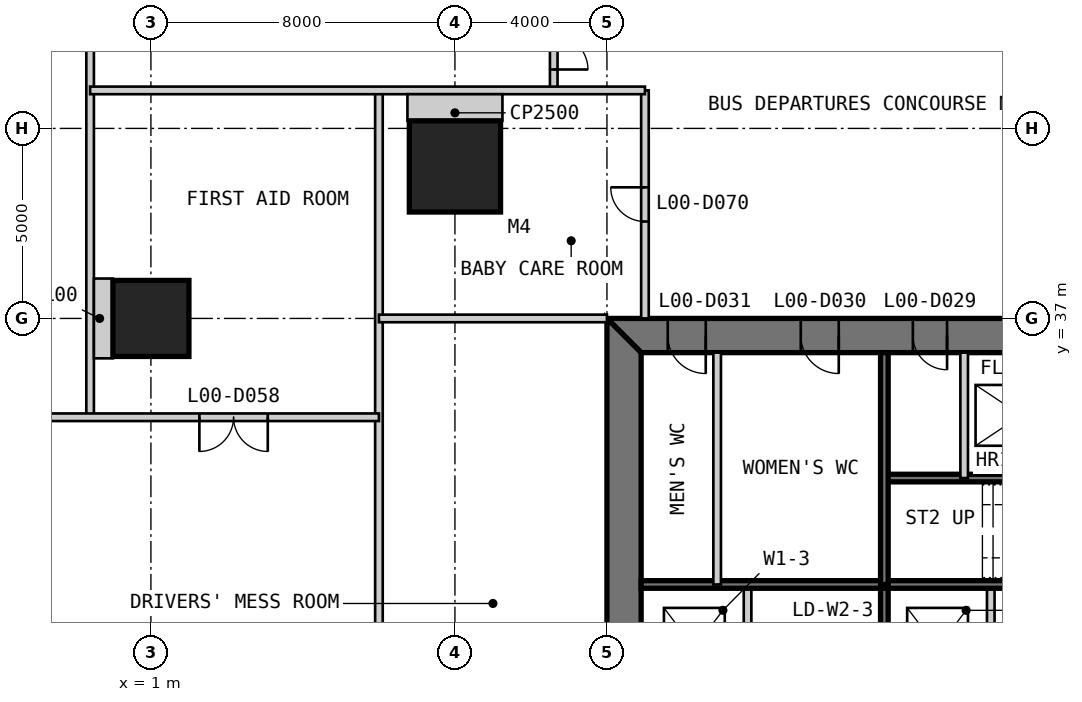
"""IFC4 building model, lengths in metres.
Left out: names, types, materials, properties, quantities, classifications, styles, units other than length and angle.
Written with IfcOpenShell. Run it as: python <this file> out.ifc"""

import sys

from ifc_helpers import new_model, si_unit, direction, frame, frame_2d, origin, origin_2d, place, context, subcontext, project, spatial, polyline, rectangle, outline, extrude, element, fill, save


model = new_model("IFC4")
c1 = context("Model", 3, precision=1e-05, world=origin(), true_north=direction((0.0, 1.0)))
c2 = subcontext(c1, "Body", "Model", "MODEL_VIEW")
j1 = project(units=[si_unit("LENGTHUNIT", "METRE"), si_unit("PLANEANGLEUNIT", "RADIAN")], contexts=[c1])
p1 = place(None, origin())
s1 = spatial("IfcSite", under=j1, at=p1, CompositionType="ELEMENT")
p2 = place(p1, origin())
s2 = spatial("IfcBuilding", under=s1, at=p2, CompositionType="ELEMENT")
p3 = place(p2, origin())
s3 = spatial("IfcBuildingStorey", under=s2, at=p3, CompositionType="ELEMENT", Elevation=0.0)
p4 = place(p3, frame((9.0, 41.0, 0.0), z_axis=(0.0, 0.0, 1.0), x_axis=(1.0, 0.0, 0.0)))
e1 = element("IfcColumn", 1, at=p4, inside=s3, PredefinedType="COLUMN", context=c2, shape_type="SweptSolid", body=[
    extrude(rectangle(XDim=2.4, YDim=2.4, at=origin_2d()), origin(), (0.0, 0.0, 1.0), 7.0),
])
p5 = place(p3, frame((1.0, 37.0, 0.0), z_axis=(0.0, 0.0, 1.0), x_axis=(1.0, 0.0, 0.0)))
e2 = element("IfcColumn", 2, at=p5, inside=s3, PredefinedType="COLUMN", context=c2, shape_type="SweptSolid", body=[
    extrude(rectangle(XDim=2.0, YDim=2.0, at=origin_2d()), origin(), (0.0, 0.0, 1.0), 7.0),
])
p6 = place(p3, frame((37.0, 36.55, 0.0), z_axis=(0.0, 0.0, 1.0), x_axis=(-1.0, 0.0, 0.0)))
e3 = element("IfcWall", 3, at=p6, inside=s3, PredefinedType="SHEAR", context=c2, shape_type="SweptSolid", body=[
    extrude(outline(polyline([(0.0, -0.45), (24.0, -0.45), (23.1, 0.45), (0.9, 0.45), (0.0, -0.45)])), origin(), (0.0, 0.0, 1.0), 7.0),
])
p7 = place(p6, frame((4.9, 0.0, 0.0)))
e4 = element("IfcOpeningElement", 4, at=p7, cuts=e3, PredefinedType="OPENING", context=c2, shape_type="SweptSolid", body=[
    extrude(rectangle(XDim=1.0, YDim=2.2, at=frame_2d((0.5, 1.1))), frame((0.0, 0.46, 0.0), z_axis=(0.0, -1.0, 0.0), x_axis=(1.0, 0.0, 0.0)), (0.0, 0.0, 1.0), 0.92),
])
p8 = place(p6, frame((8.9, 0.0, 0.0)))
e5 = element("IfcOpeningElement", 5, at=p8, cuts=e3, PredefinedType="OPENING", context=c2, shape_type="SweptSolid", body=[
    extrude(rectangle(XDim=1.1, YDim=2.2, at=frame_2d((0.55, 1.1))), frame((0.0, 0.46, 0.0), z_axis=(0.0, -1.0, 0.0), x_axis=(1.0, 0.0, 0.0)), (0.0, 0.0, 1.0), 0.92),
])
p9 = place(p6, frame((15.05, 0.0, 0.0)))
e6 = element("IfcOpeningElement", 6, at=p9, cuts=e3, PredefinedType="OPENING", context=c2, shape_type="SweptSolid", body=[
    extrude(rectangle(XDim=0.9, YDim=2.2, at=frame_2d((0.45, 1.1))), frame((0.0, 0.46, 0.0), z_axis=(0.0, -1.0, 0.0), x_axis=(1.0, 0.0, 0.0)), (0.0, 0.0, 1.0), 0.92),
])
p10 = place(p6, frame((17.9, 0.0, 0.0)))
e7 = element("IfcOpeningElement", 7, at=p10, cuts=e3, PredefinedType="OPENING", context=c2, shape_type="SweptSolid", body=[
    extrude(rectangle(XDim=1.0, YDim=2.2, at=frame_2d((0.5, 1.1))), frame((0.0, 0.46, 0.0), z_axis=(0.0, -1.0, 0.0), x_axis=(1.0, 0.0, 0.0)), (0.0, 0.0, 1.0), 0.92),
])
p11 = place(p6, frame((21.4, 0.0, 0.0)))
e8 = element("IfcOpeningElement", 8, at=p11, cuts=e3, PredefinedType="OPENING", context=c2, shape_type="SweptSolid", body=[
    extrude(rectangle(XDim=1.0, YDim=2.2, at=frame_2d((0.5, 1.1))), frame((0.0, 0.46, 0.0), z_axis=(0.0, -1.0, 0.0), x_axis=(1.0, 0.0, 0.0)), (0.0, 0.0, 1.0), 0.92),
])
p12 = place(p3, frame((13.45, 36.1, 0.0), z_axis=(0.0, 0.0, 1.0), x_axis=(0.0, -1.0, 0.0)))
e9 = element("IfcWall", 9, at=p12, inside=s3, PredefinedType="SHEAR", context=c2, shape_type="SweptSolid", body=[
    extrude(outline(polyline([(-0.9, -0.45), (23.1, -0.45), (22.2, 0.45), (0.0, 0.45), (-0.9, -0.45)])), origin(), (0.0, 0.0, 1.0), 7.0),
])
p13 = place(p12, frame((20.2, 0.0, 0.0)))
e10 = element("IfcOpeningElement", 10, at=p13, cuts=e9, PredefinedType="OPENING", context=c2, shape_type="SweptSolid", body=[
    extrude(rectangle(XDim=1.0, YDim=2.2, at=frame_2d((0.5, 1.1))), frame((0.0, 0.46, 0.0), z_axis=(0.0, -1.0, 0.0), x_axis=(1.0, 0.0, 0.0)), (0.0, 0.0, 1.0), 0.92),
])
p14 = place(p12, frame((17.25, 0.0, 0.0)))
e11 = element("IfcOpeningElement", 11, at=p14, cuts=e9, PredefinedType="OPENING", context=c2, shape_type="SweptSolid", body=[
    extrude(rectangle(XDim=0.9, YDim=2.2, at=frame_2d((0.45, 1.1))), frame((0.0, 0.46, 0.0), z_axis=(0.0, -1.0, 0.0), x_axis=(1.0, 0.0, 0.0)), (0.0, 0.0, 1.0), 0.92),
])
p15 = place(p3, frame((16.7, 13.9, 0.0), z_axis=(0.0, 0.0, 1.0), x_axis=(0.0, 1.0, 0.0)))
e12 = element("IfcWall", 12, at=p15, inside=s3, PredefinedType="PARTITIONING", context=c2, shape_type="SweptSolid", body=[
    extrude(rectangle(XDim=16.1, YDim=0.2, at=frame_2d((8.05, 0.0))), origin(), (0.0, 0.0, 1.0), 6.8),
])
p16 = place(p15, frame((3.8, 0.0, 0.0)))
e13 = element("IfcOpeningElement", 13, at=p16, cuts=e12, PredefinedType="OPENING", context=c2, shape_type="SweptSolid", body=[
    extrude(rectangle(XDim=0.9, YDim=2.2, at=frame_2d((0.45, 1.1))), frame((0.0, 0.11, 0.0), z_axis=(0.0, -1.0, 0.0), x_axis=(1.0, 0.0, 0.0)), (0.0, 0.0, 1.0), 0.22),
])
p17 = place(p15, frame((7.217, 0.0, 0.0)))
e14 = element("IfcOpeningElement", 14, at=p17, cuts=e12, PredefinedType="OPENING", context=c2, shape_type="SweptSolid", body=[
    extrude(rectangle(XDim=1.1, YDim=2.2, at=frame_2d((0.55, 1.1))), frame((0.0, 0.11, 0.0), z_axis=(0.0, -1.0, 0.0), x_axis=(1.0, 0.0, 0.0)), (0.0, 0.0, 1.0), 0.22),
])
p18 = place(p15, frame((10.55, 0.0, 0.0)))
e15 = element("IfcOpeningElement", 15, at=p18, cuts=e12, PredefinedType="OPENING", context=c2, shape_type="SweptSolid", body=[
    extrude(rectangle(XDim=1.1, YDim=2.2, at=frame_2d((0.55, 1.1))), frame((0.0, 0.11, 0.0), z_axis=(0.0, -1.0, 0.0), x_axis=(1.0, 0.0, 0.0)), (0.0, 0.0, 1.0), 0.22),
])
p19 = place(p15, frame((13.883, 0.0, 0.0)))
e16 = element("IfcOpeningElement", 16, at=p19, cuts=e12, PredefinedType="OPENING", context=c2, shape_type="SweptSolid", body=[
    extrude(rectangle(XDim=1.1, YDim=2.2, at=frame_2d((0.55, 1.1))), frame((0.0, 0.11, 0.0), z_axis=(0.0, -1.0, 0.0), x_axis=(1.0, 0.0, 0.0)), (0.0, 0.0, 1.0), 0.22),
])
p20 = place(p3, frame((20.3, 13.9, 0.0), z_axis=(0.0, 0.0, 1.0), x_axis=(0.0, 1.0, 0.0)))
e17 = element("IfcWall", 17, at=p20, inside=s3, PredefinedType="SOLIDWALL", context=c2, shape_type="SweptSolid", body=[
    extrude(rectangle(XDim=16.1, YDim=0.2, at=frame_2d((8.05, 0.0))), origin(), (0.0, 0.0, 1.0), 6.8),
])
p21 = place(p20, frame((7.217, 0.0, 0.0)))
e18 = element("IfcOpeningElement", 18, at=p21, cuts=e17, PredefinedType="OPENING", context=c2, shape_type="SweptSolid", body=[
    extrude(rectangle(XDim=1.1, YDim=2.2, at=frame_2d((0.55, 1.1))), frame((0.0, 0.11, 0.0), z_axis=(0.0, -1.0, 0.0), x_axis=(1.0, 0.0, 0.0)), (0.0, 0.0, 1.0), 0.22),
])
p22 = place(p20, frame((10.55, 0.0, 0.0)))
e19 = element("IfcOpeningElement", 19, at=p22, cuts=e17, PredefinedType="OPENING", context=c2, shape_type="SweptSolid", body=[
    extrude(rectangle(XDim=1.1, YDim=2.2, at=frame_2d((0.55, 1.1))), frame((0.0, 0.11, 0.0), z_axis=(0.0, -1.0, 0.0), x_axis=(1.0, 0.0, 0.0)), (0.0, 0.0, 1.0), 0.22),
])
p23 = place(p20, frame((13.883, 0.0, 0.0)))
e20 = element("IfcOpeningElement", 20, at=p23, cuts=e17, PredefinedType="OPENING", context=c2, shape_type="SweptSolid", body=[
    extrude(rectangle(XDim=1.1, YDim=2.2, at=frame_2d((0.55, 1.1))), frame((0.0, 0.11, 0.0), z_axis=(0.0, -1.0, 0.0), x_axis=(1.0, 0.0, 0.0)), (0.0, 0.0, 1.0), 0.22),
])
p24 = place(p3, frame((23.1, 20.0, 0.0), z_axis=(0.0, 0.0, 1.0), x_axis=(0.0, 1.0, 0.0)))
e21 = element("IfcWall", 21, at=p24, inside=s3, PredefinedType="PARTITIONING", context=c2, shape_type="SweptSolid", body=[
    extrude(rectangle(XDim=10.0, YDim=0.2, at=frame_2d((5.0, 0.0))), origin(), (0.0, 0.0, 1.0), 6.8),
])
p25 = place(p3, frame((29.7, 32.8, 0.0), z_axis=(0.0, 0.0, 1.0), x_axis=(-1.0, 0.0, 0.0)))
e22 = element("IfcWall", 22, at=p25, inside=s3, PredefinedType="SOLIDWALL", context=c2, shape_type="SweptSolid", body=[
    extrude(rectangle(XDim=9.4, YDim=0.2, at=frame_2d((4.7, 0.0))), origin(), (0.0, 0.0, 1.0), 6.8),
])
p26 = place(p25, frame((0.25, 0.0, 0.0)))
e23 = element("IfcOpeningElement", 23, at=p26, cuts=e22, PredefinedType="OPENING", context=c2, shape_type="SweptSolid", body=[
    extrude(rectangle(XDim=1.0, YDim=2.2, at=frame_2d((0.5, 1.1))), frame((0.0, 0.11, 0.0), z_axis=(0.0, -1.0, 0.0), x_axis=(1.0, 0.0, 0.0)), (0.0, 0.0, 1.0), 0.22),
])
p27 = place(p3, frame((29.7, 30.0, 0.0), z_axis=(0.0, 0.0, 1.0), x_axis=(-1.0, 0.0, 0.0)))
e24 = element("IfcWall", 24, at=p27, inside=s3, PredefinedType="SOLIDWALL", context=c2, shape_type="SweptSolid", body=[
    extrude(rectangle(XDim=15.8, YDim=0.2, at=frame_2d((7.9, 0.0))), origin(), (0.0, 0.0, 1.0), 6.8),
])
p28 = place(p3, frame((22.4, 36.1, 0.0), z_axis=(0.0, 0.0, 1.0), x_axis=(0.0, -1.0, 0.0)))
e25 = element("IfcWall", 25, at=p28, inside=s3, PredefinedType="PARTITIONING", context=c2, shape_type="SweptSolid", body=[
    extrude(rectangle(XDim=3.3, YDim=0.2, at=frame_2d((1.65, 0.0))), origin(), (0.0, 0.0, 1.0), 6.8),
])
p29 = place(p3, frame((20.3, 36.1, 0.0), z_axis=(0.0, 0.0, 1.0), x_axis=(0.0, -1.0, 0.0)))
e26 = element("IfcWall", 26, at=p29, inside=s3, PredefinedType="SOLIDWALL", context=c2, shape_type="SweptSolid", body=[
    extrude(rectangle(XDim=6.1, YDim=0.2, at=frame_2d((3.05, 0.0))), origin(), (0.0, 0.0, 1.0), 6.8),
])
p30 = place(p3, frame((15.9, 36.1, 0.0), z_axis=(0.0, 0.0, 1.0), x_axis=(0.0, -1.0, 0.0)))
e27 = element("IfcWall", 27, at=p30, inside=s3, PredefinedType="PARTITIONING", context=c2, shape_type="SweptSolid", body=[
    extrude(rectangle(XDim=6.1, YDim=0.2, at=frame_2d((3.05, 0.0))), origin(), (0.0, 0.0, 1.0), 6.8),
])
p31 = place(p3, frame((-0.6, 34.4, 0.0), z_axis=(0.0, 0.0, 1.0), x_axis=(0.0, 1.0, 0.0)))
e28 = element("IfcWall", 28, at=p31, inside=s3, PredefinedType="PARTITIONING", context=c2, shape_type="SweptSolid", body=[
    extrude(rectangle(XDim=23.2, YDim=0.2, at=frame_2d((11.6, 0.0))), origin(), (0.0, 0.0, 1.0), 6.7),
])
p32 = place(p3, frame((7.0, 22.0, 0.0), z_axis=(0.0, 0.0, 1.0), x_axis=(0.0, 1.0, 0.0)))
e29 = element("IfcWall", 29, at=p32, inside=s3, PredefinedType="PARTITIONING", context=c2, shape_type="SweptSolid", body=[
    extrude(rectangle(XDim=21.0, YDim=0.2, at=frame_2d((10.5, 0.0))), origin(), (0.0, 0.0, 1.0), 6.043),
])
p33 = place(p32, frame((4.05, 0.0, 0.0)))
e30 = element("IfcOpeningElement", 30, at=p33, cuts=e29, PredefinedType="OPENING", context=c2, shape_type="SweptSolid", body=[
    extrude(rectangle(XDim=1.8, YDim=2.4, at=frame_2d((0.9, 1.2))), frame((0.0, 0.11, 0.0), z_axis=(0.0, -1.0, 0.0), x_axis=(1.0, 0.0, 0.0)), (0.0, 0.0, 1.0), 0.22),
])
p34 = place(p3, frame((11.6, 43.0, 0.0), z_axis=(0.0, 0.0, 1.0), x_axis=(0.0, 1.0, 0.0)))
e31 = element("IfcWall", 31, at=p34, inside=s3, PredefinedType="PARTITIONING", context=c2, shape_type="SweptSolid", body=[
    extrude(rectangle(XDim=22.25, YDim=0.2, at=frame_2d((11.125, 0.0))), origin(), (0.0, 0.0, 1.0), 6.7),
])
p35 = place(p34, frame((7.175, 0.0, 0.0)))
e32 = element("IfcOpeningElement", 32, at=p35, cuts=e31, PredefinedType="OPENING", context=c2, shape_type="SweptSolid", body=[
    extrude(rectangle(XDim=1.8, YDim=2.4, at=frame_2d((0.9, 1.2))), frame((0.0, 0.11, 0.0), z_axis=(0.0, -1.0, 0.0), x_axis=(1.0, 0.0, 0.0)), (0.0, 0.0, 1.0), 0.22),
])
p36 = place(p34, frame((0.55, 0.0, 0.0)))
e33 = element("IfcOpeningElement", 33, at=p36, cuts=e31, PredefinedType="OPENING", context=c2, shape_type="SweptSolid", body=[
    extrude(rectangle(XDim=1.8, YDim=2.4, at=frame_2d((0.9, 1.2))), frame((0.0, 0.11, 0.0), z_axis=(0.0, -1.0, 0.0), x_axis=(1.0, 0.0, 0.0)), (0.0, 0.0, 1.0), 0.22),
])
p37 = place(p34, frame((17.5, 0.0, 0.0)))
e34 = element("IfcOpeningElement", 34, at=p37, cuts=e31, PredefinedType="OPENING", context=c2, shape_type="SweptSolid", body=[
    extrude(rectangle(XDim=1.8, YDim=2.4, at=frame_2d((0.9, 1.2))), frame((0.0, 0.11, 0.0), z_axis=(0.0, -1.0, 0.0), x_axis=(1.0, 0.0, 0.0)), (0.0, 0.0, 1.0), 0.22),
])
p38 = place(p3, frame((14.0, 37.0, 0.0), z_axis=(0.0, 0.0, 1.0), x_axis=(0.0, 1.0, 0.0)))
e35 = element("IfcWall", 35, at=p38, inside=s3, PredefinedType="PARTITIONING", context=c2, shape_type="SweptSolid", body=[
    extrude(rectangle(XDim=6.0, YDim=0.2, at=frame_2d((3.0, 0.0))), origin(), (0.0, 0.0, 1.0), 6.7),
])
p39 = place(p38, frame((2.55, 0.0, 0.0)))
e36 = element("IfcOpeningElement", 36, at=p39, cuts=e35, PredefinedType="OPENING", context=c2, shape_type="SweptSolid", body=[
    extrude(rectangle(XDim=0.9, YDim=2.2, at=frame_2d((0.45, 1.1))), frame((0.0, 0.11, 0.0), z_axis=(0.0, -1.0, 0.0), x_axis=(1.0, 0.0, 0.0)), (0.0, 0.0, 1.0), 0.22),
])
p40 = place(p3, frame((-15.25, 34.4, 0.0), z_axis=(0.0, 0.0, 1.0), x_axis=(1.0, 0.0, 0.0)))
e37 = element("IfcWall", 37, at=p40, inside=s3, PredefinedType="PARTITIONING", context=c2, shape_type="SweptSolid", body=[
    extrude(rectangle(XDim=22.25, YDim=0.2, at=frame_2d((11.125, 0.0))), origin(), (0.0, 0.0, 1.0), 6.7),
])
p41 = place(p40, frame((17.525, 0.0, 0.0)))
e38 = element("IfcOpeningElement", 38, at=p41, cuts=e37, PredefinedType="OPENING", context=c2, shape_type="SweptSolid", body=[
    extrude(rectangle(XDim=1.8, YDim=2.4, at=frame_2d((0.9, 1.2))), frame((0.0, 0.11, 0.0), z_axis=(0.0, -1.0, 0.0), x_axis=(1.0, 0.0, 0.0)), (0.0, 0.0, 1.0), 0.22),
])
p42 = place(p40, frame((10.325, 0.0, 0.0)))
e39 = element("IfcOpeningElement", 39, at=p42, cuts=e37, PredefinedType="OPENING", context=c2, shape_type="SweptSolid", body=[
    extrude(rectangle(XDim=1.8, YDim=2.4, at=frame_2d((0.9, 1.2))), frame((0.0, 0.11, 0.0), z_axis=(0.0, -1.0, 0.0), x_axis=(1.0, 0.0, 0.0)), (0.0, 0.0, 1.0), 0.22),
])
p43 = place(p40, frame((3.025, 0.0, 0.0)))
e40 = element("IfcOpeningElement", 40, at=p43, cuts=e37, PredefinedType="OPENING", context=c2, shape_type="SweptSolid", body=[
    extrude(rectangle(XDim=1.8, YDim=2.4, at=frame_2d((0.9, 1.2))), frame((0.0, 0.11, 0.0), z_axis=(0.0, -1.0, 0.0), x_axis=(1.0, 0.0, 0.0)), (0.0, 0.0, 1.0), 0.22),
])
p44 = place(p3, frame((7.0, 37.0, 0.0), z_axis=(0.0, 0.0, 1.0), x_axis=(1.0, 0.0, 0.0)))
e41 = element("IfcWall", 41, at=p44, inside=s3, PredefinedType="PARTITIONING", context=c2, shape_type="SweptSolid", body=[
    extrude(rectangle(XDim=6.0, YDim=0.2, at=frame_2d((3.0, 0.0))), origin(), (0.0, 0.0, 1.0), 5.853),
])
p45 = place(p3, frame((-0.6, 43.0, 0.0), z_axis=(0.0, 0.0, 1.0), x_axis=(1.0, 0.0, 0.0)))
e42 = element("IfcWall", 42, at=p45, inside=s3, PredefinedType="PARTITIONING", context=c2, shape_type="SweptSolid", body=[
    extrude(rectangle(XDim=14.6, YDim=0.2, at=frame_2d((7.3, 0.0))), origin(), (0.0, 0.0, 1.0), 6.7),
])
p46 = place(p3, frame((-0.5, 37.0, 0.0), z_axis=(0.0, 0.0, 1.0), x_axis=(1.0, 0.0, 0.0)))
e43 = element("IfcWall", 43, at=p46, inside=s3, PredefinedType="PARTITIONING", context=c2, shape_type="SweptSolid", body=[
    extrude(rectangle(XDim=0.5, YDim=2.1, at=frame_2d((0.25, 0.0))), origin(), (0.0, 0.0, 1.0), 6.7),
])
p47 = place(p3, frame((9.0, 42.9, 0.0), z_axis=(0.0, 0.0, 1.0), x_axis=(0.0, -1.0, 0.0)))
e44 = element("IfcWall", 44, at=p47, inside=s3, PredefinedType="PARTITIONING", context=c2, shape_type="SweptSolid", body=[
    extrude(rectangle(XDim=0.7, YDim=2.5, at=frame_2d((0.35, 0.0))), origin(), (0.0, 0.0, 1.0), 6.7),
])
p48 = place(p9, origin())
e45 = element("IfcDoor", 45, at=p48, inside=s3, OperationType="SINGLE_SWING_LEFT", PredefinedType="DOOR", context=c2, shape_type="SweptSolid", body=[
    extrude(rectangle(XDim=0.9, YDim=2.2, at=frame_2d((0.45, 1.1))), frame((0.0, 0.025, 0.0), z_axis=(0.0, -1.0, 0.0), x_axis=(1.0, 0.0, 0.0)), (0.0, 0.0, 1.0), 0.05),
    extrude(outline(polyline([(0.0, 0.0), (0.04, 0.0), (0.04, 2.16), (0.86, 2.16), (0.86, 0.0), (0.9, 0.0), (0.9, 2.2), (0.0, 2.2), (0.0, 0.0)])), frame((0.0, 0.3, 0.0), z_axis=(0.0, -1.0, 0.0), x_axis=(1.0, 0.0, 0.0)), (0.0, 0.0, 1.0), 0.6),
])
fill(e6, e45)
p49 = place(p10, origin())
e46 = element("IfcDoor", 46, at=p49, inside=s3, OperationType="SINGLE_SWING_LEFT", PredefinedType="DOOR", context=c2, shape_type="SweptSolid", body=[
    extrude(rectangle(XDim=1.0, YDim=2.2, at=frame_2d((0.5, 1.1))), frame((0.0, 0.025, 0.0), z_axis=(0.0, -1.0, 0.0), x_axis=(1.0, 0.0, 0.0)), (0.0, 0.0, 1.0), 0.05),
    extrude(outline(polyline([(0.0, 0.0), (0.04, 0.0), (0.04, 2.16), (0.96, 2.16), (0.96, 0.0), (1.0, 0.0), (1.0, 2.2), (0.0, 2.2), (0.0, 0.0)])), frame((0.0, 0.3, 0.0), z_axis=(0.0, -1.0, 0.0), x_axis=(1.0, 0.0, 0.0)), (0.0, 0.0, 1.0), 0.6),
])
fill(e7, e46)
p50 = place(p11, origin())
e47 = element("IfcDoor", 47, at=p50, inside=s3, OperationType="SINGLE_SWING_LEFT", PredefinedType="DOOR", context=c2, shape_type="SweptSolid", body=[
    extrude(rectangle(XDim=1.0, YDim=2.2, at=frame_2d((0.5, 1.1))), frame((0.0, 0.025, 0.0), z_axis=(0.0, -1.0, 0.0), x_axis=(1.0, 0.0, 0.0)), (0.0, 0.0, 1.0), 0.05),
    extrude(outline(polyline([(0.0, 0.0), (0.04, 0.0), (0.04, 2.16), (0.96, 2.16), (0.96, 0.0), (1.0, 0.0), (1.0, 2.2), (0.0, 2.2), (0.0, 0.0)])), frame((0.0, 0.3, 0.0), z_axis=(0.0, -1.0, 0.0), x_axis=(1.0, 0.0, 0.0)), (0.0, 0.0, 1.0), 0.6),
])
fill(e8, e47)
p51 = place(p41, frame((1.8, 0.0, 0.0), z_axis=(0.0, 0.0, 1.0), x_axis=(-1.0, 0.0, 0.0)))
e48 = element("IfcDoor", 48, at=p51, inside=s3, OperationType="DOUBLE_DOOR_SINGLE_SWING", PredefinedType="DOOR", context=c2, shape_type="SweptSolid", body=[
    extrude(rectangle(XDim=1.8, YDim=2.4, at=frame_2d((0.9, 1.2))), frame((0.0, 0.025, 0.0), z_axis=(0.0, -1.0, 0.0), x_axis=(1.0, 0.0, 0.0)), (0.0, 0.0, 1.0), 0.05),
])
fill(e38, e48)
p52 = place(p36, frame((1.8, 0.0, 0.0), z_axis=(0.0, 0.0, 1.0), x_axis=(-1.0, 0.0, 0.0)))
e49 = element("IfcDoor", 49, at=p52, inside=s3, OperationType="DOUBLE_DOOR_SINGLE_SWING", PredefinedType="DOOR", context=c2, shape_type="SweptSolid", body=[
    extrude(rectangle(XDim=1.8, YDim=2.4, at=frame_2d((0.9, 1.2))), frame((0.0, 0.025, 0.0), z_axis=(0.0, -1.0, 0.0), x_axis=(1.0, 0.0, 0.0)), (0.0, 0.0, 1.0), 0.05),
])
fill(e33, e49)
p53 = place(p39, origin())
e50 = element("IfcDoor", 50, at=p53, inside=s3, OperationType="SINGLE_SWING_RIGHT", PredefinedType="DOOR", context=c2, shape_type="SweptSolid", body=[
    extrude(rectangle(XDim=0.9, YDim=2.2, at=frame_2d((0.45, 1.1))), frame((0.0, 0.025, 0.0), z_axis=(0.0, -1.0, 0.0), x_axis=(1.0, 0.0, 0.0)), (0.0, 0.0, 1.0), 0.05),
])
fill(e36, e50)
save(model, sys.argv[1])
